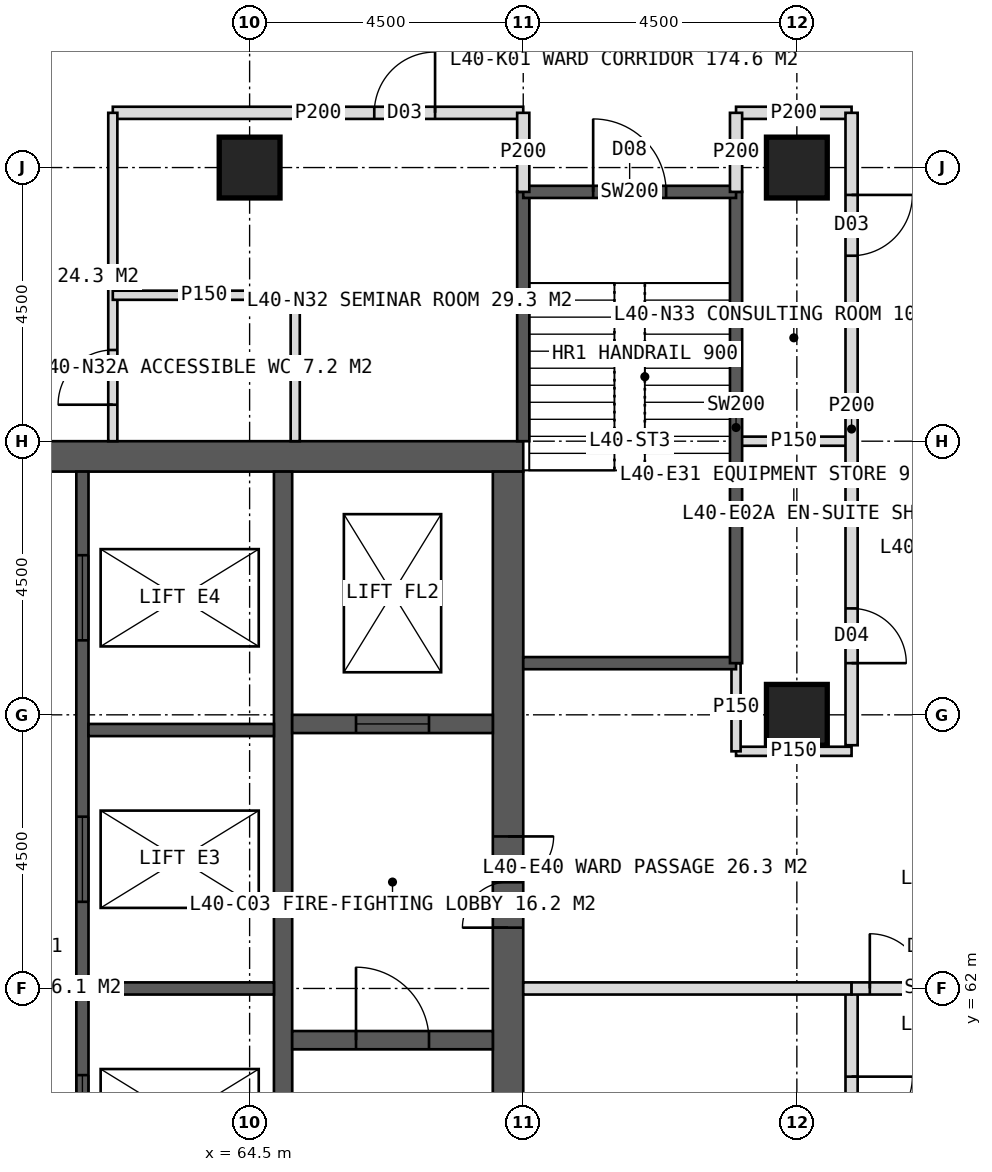
"""IFC4 building model, lengths in metres.
Left out: names, types, materials, properties, quantities, classifications, styles, units other than length and angle.
Written with IfcOpenShell. Run it as: python <this file> out.ifc"""

import sys

from ifc_helpers import new_model, si_unit, direction, frame, frame_2d, origin, origin_2d, place, context, subcontext, project, spatial, rectangle, hollow_rectangle, extrude, element, fill, save


model = new_model("IFC4")
c1 = context("Model", 3, precision=1e-05, world=origin(), true_north=direction((0.0, 1.0)))
c2 = subcontext(c1, "Body", "Model", "MODEL_VIEW")
j1 = project(units=[si_unit("LENGTHUNIT", "METRE"), si_unit("PLANEANGLEUNIT", "RADIAN")], contexts=[c1])
p1 = place(None, origin())
s1 = spatial("IfcSite", under=j1, at=p1, CompositionType="ELEMENT")
p2 = place(p1, origin())
s2 = spatial("IfcBuilding", under=s1, at=p2, CompositionType="ELEMENT")
p3 = place(p2, frame((0.0, 0.0, 168.0)))
s3 = spatial("IfcBuildingStorey", under=s2, at=p3, CompositionType="ELEMENT", Elevation=168.0)
p4 = place(p3, frame((51.0, 70.75, 0.0), z_axis=(0.0, 0.0, 1.0), x_axis=(1.0, 0.0, 0.0)))
e1 = element("IfcWall", 1, at=p4, inside=s3, PredefinedType="SHEAR", context=c2, shape_type="SweptSolid", body=[
    extrude(rectangle(XDim=18.0, YDim=0.5, at=frame_2d((9.0, 0.0))), origin(), (0.0, 0.0, 1.0), 4.0),
])
p5 = place(p4, frame((8.1, 0.0, 0.0)))
e2 = element("IfcOpeningElement", 2, at=p5, cuts=e1, PredefinedType="OPENING", context=c2, shape_type="SweptSolid", body=[
    extrude(rectangle(XDim=1.8, YDim=2.2, at=frame_2d((0.9, 1.1))), frame((0.0, 0.26, 0.0), z_axis=(0.0, -1.0, 0.0), x_axis=(1.0, 0.0, 0.0)), (0.0, 0.0, 1.0), 0.52),
])
p6 = place(p3, frame((68.75, 53.5, 0.0), z_axis=(0.0, 0.0, 1.0), x_axis=(0.0, 1.0, 0.0)))
e3 = element("IfcWall", 3, at=p6, inside=s3, PredefinedType="SHEAR", context=c2, shape_type="SweptSolid", body=[
    extrude(rectangle(XDim=17.0, YDim=0.5, at=frame_2d((8.5, 0.0))), origin(), (0.0, 0.0, 1.0), 4.0),
])
p7 = place(p6, frame((9.5, 0.0, 0.0)))
e4 = element("IfcOpeningElement", 4, at=p7, cuts=e3, PredefinedType="OPENING", context=c2, shape_type="SweptSolid", body=[
    extrude(rectangle(XDim=1.5, YDim=2.2, at=frame_2d((0.75, 1.1))), frame((0.0, 0.26, 0.0), z_axis=(0.0, -1.0, 0.0), x_axis=(1.0, 0.0, 0.0)), (0.0, 0.0, 1.0), 0.52),
])
p8 = place(p3, frame((65.05, 53.5, 0.0), z_axis=(0.0, 0.0, 1.0), x_axis=(0.0, 1.0, 0.0)))
e5 = element("IfcWall", 5, at=p8, inside=s3, PredefinedType="SHEAR", context=c2, shape_type="SweptSolid", body=[
    extrude(rectangle(XDim=17.0, YDim=0.3, at=frame_2d((8.5, 0.0))), origin(), (0.0, 0.0, 1.0), 4.0),
])
p9 = place(p3, frame((61.75, 53.5, 0.0), z_axis=(0.0, 0.0, 1.0), x_axis=(0.0, 1.0, 0.0)))
e6 = element("IfcWall", 6, at=p9, inside=s3, PredefinedType="SHEAR", context=c2, shape_type="SweptSolid", body=[
    extrude(rectangle(XDim=17.0, YDim=0.2, at=frame_2d((8.5, 0.0))), origin(), (0.0, 0.0, 1.0), 4.0),
])
p10 = place(p9, frame((1.375, 0.0, 0.0)))
e7 = element("IfcOpeningElement", 7, at=p10, cuts=e6, PredefinedType="OPENING", context=c2, shape_type="SweptSolid", body=[
    extrude(rectangle(XDim=1.4, YDim=2.2, at=frame_2d((0.7, 1.1))), frame((0.0, 0.11, 0.0), z_axis=(0.0, -1.0, 0.0), x_axis=(1.0, 0.0, 0.0)), (0.0, 0.0, 1.0), 0.22),
])
p11 = place(p9, frame((5.675, 0.0, 0.0)))
e8 = element("IfcOpeningElement", 8, at=p11, cuts=e6, PredefinedType="OPENING", context=c2, shape_type="SweptSolid", body=[
    extrude(rectangle(XDim=1.4, YDim=2.2, at=frame_2d((0.7, 1.1))), frame((0.0, 0.11, 0.0), z_axis=(0.0, -1.0, 0.0), x_axis=(1.0, 0.0, 0.0)), (0.0, 0.0, 1.0), 0.22),
])
p12 = place(p9, frame((9.925, 0.0, 0.0)))
e9 = element("IfcOpeningElement", 9, at=p12, cuts=e6, PredefinedType="OPENING", context=c2, shape_type="SweptSolid", body=[
    extrude(rectangle(XDim=1.4, YDim=2.2, at=frame_2d((0.7, 1.1))), frame((0.0, 0.11, 0.0), z_axis=(0.0, -1.0, 0.0), x_axis=(1.0, 0.0, 0.0)), (0.0, 0.0, 1.0), 0.22),
])
p13 = place(p9, frame((14.225, 0.0, 0.0)))
e10 = element("IfcOpeningElement", 10, at=p13, cuts=e6, PredefinedType="OPENING", context=c2, shape_type="SweptSolid", body=[
    extrude(rectangle(XDim=1.4, YDim=2.2, at=frame_2d((0.7, 1.1))), frame((0.0, 0.11, 0.0), z_axis=(0.0, -1.0, 0.0), x_axis=(1.0, 0.0, 0.0)), (0.0, 0.0, 1.0), 0.22),
])
for number, where, z_axis, x_axis in (
    (11, (61.85, 62.0, 0.0), (0.0, 0.0, 1.0), (1.0, 0.0, 0.0)),
    (12, (61.85, 66.25, 0.0), (0.0, 0.0, 1.0), (1.0, 0.0, 0.0)),
):
    element("IfcWall", number, at=place(p3, frame(where, z_axis=z_axis, x_axis=x_axis)), inside=s3, PredefinedType="SHEAR", context=c2, shape_type="SweptSolid", body=[
        extrude(rectangle(XDim=3.05, YDim=0.2, at=frame_2d((1.525, 0.0))), origin(), (0.0, 0.0, 1.0), 4.0),
    ])
p14 = place(p3, frame((65.2, 61.15, 0.0), z_axis=(0.0, 0.0, 1.0), x_axis=(1.0, 0.0, 0.0)))
e13 = element("IfcWall", 13, at=p14, inside=s3, PredefinedType="SHEAR", context=c2, shape_type="SweptSolid", body=[
    extrude(rectangle(XDim=3.3, YDim=0.3, at=frame_2d((1.65, 0.0))), origin(), (0.0, 0.0, 1.0), 4.0),
])
p15 = place(p14, frame((1.05, 0.0, 0.0)))
e14 = element("IfcOpeningElement", 14, at=p15, cuts=e13, PredefinedType="OPENING", context=c2, shape_type="SweptSolid", body=[
    extrude(rectangle(XDim=1.2, YDim=2.1, at=frame_2d((0.6, 1.05))), frame((0.0, 0.16, 0.0), z_axis=(0.0, -1.0, 0.0), x_axis=(1.0, 0.0, 0.0)), (0.0, 0.0, 1.0), 0.32),
])
p16 = place(p3, frame((65.2, 66.35, 0.0), z_axis=(0.0, 0.0, 1.0), x_axis=(1.0, 0.0, 0.0)))
e15 = element("IfcWall", 15, at=p16, inside=s3, PredefinedType="SHEAR", context=c2, shape_type="SweptSolid", body=[
    extrude(rectangle(XDim=3.3, YDim=0.3, at=frame_2d((1.65, 0.0))), origin(), (0.0, 0.0, 1.0), 4.0),
])
p17 = place(p16, frame((1.05, 0.0, 0.0)))
e16 = element("IfcOpeningElement", 16, at=p17, cuts=e15, PredefinedType="OPENING", context=c2, shape_type="SweptSolid", body=[
    extrude(rectangle(XDim=1.2, YDim=2.2, at=frame_2d((0.6, 1.1))), frame((0.0, 0.16, 0.0), z_axis=(0.0, -1.0, 0.0), x_axis=(1.0, 0.0, 0.0)), (0.0, 0.0, 1.0), 0.32),
])
for number, where, z_axis, x_axis in (
    (17, (73.5, 75.5, 0.0), (0.0, 0.0, 1.0), (1.0, 0.0, 0.0)),
    (18, (64.5, 75.5, 0.0), (0.0, 0.0, 1.0), (1.0, 0.0, 0.0)),
    (19, (73.5, 66.5, 0.0), (0.0, 0.0, 1.0), (1.0, 0.0, 0.0)),
):
    element("IfcColumn", number, at=place(p3, frame(where, z_axis=z_axis, x_axis=x_axis)), inside=s3, PredefinedType="COLUMN", context=c2, shape_type="SweptSolid", body=[
        extrude(hollow_rectangle(XDim=1.0, YDim=1.0, WallThickness=0.1, at=origin_2d()), origin(), (0.0, 0.0, 1.0), 4.0),
    ])
p18 = place(p3, frame((62.25, 76.4, 0.0), z_axis=(0.0, 0.0, 1.0), x_axis=(1.0, 0.0, 0.0)))
e20 = element("IfcWall", 20, at=p18, inside=s3, PredefinedType="PARTITIONING", context=c2, shape_type="SweptSolid", body=[
    extrude(rectangle(XDim=6.75, YDim=0.2, at=frame_2d((3.375, 0.0))), origin(), (0.0, 0.0, 1.0), 3.75),
])
p19 = place(p18, frame((4.3, 0.0, 0.0)))
e21 = element("IfcOpeningElement", 21, at=p19, cuts=e20, PredefinedType="OPENING", context=c2, shape_type="SweptSolid", body=[
    extrude(rectangle(XDim=1.0, YDim=2.1, at=frame_2d((0.5, 1.05))), frame((0.0, 0.11, 0.0), z_axis=(0.0, -1.0, 0.0), x_axis=(1.0, 0.0, 0.0)), (0.0, 0.0, 1.0), 0.22),
])
p20 = place(p3, frame((72.5, 76.4, 0.0), z_axis=(0.0, 0.0, 1.0), x_axis=(1.0, 0.0, 0.0)))
e22 = element("IfcWall", 22, at=p20, inside=s3, PredefinedType="PARTITIONING", context=c2, shape_type="SweptSolid", body=[
    extrude(rectangle(XDim=1.9, YDim=0.2, at=frame_2d((0.95, 0.0))), origin(), (0.0, 0.0, 1.0), 3.75),
])
p21 = place(p3, frame((62.25, 71.0, 0.0), z_axis=(0.0, 0.0, 1.0), x_axis=(0.0, 1.0, 0.0)))
e23 = element("IfcWall", 23, at=p21, inside=s3, PredefinedType="PARTITIONING", context=c2, shape_type="SweptSolid", body=[
    extrude(rectangle(XDim=5.4, YDim=0.15, at=frame_2d((2.7, 0.0))), origin(), (0.0, 0.0, 1.0), 3.75),
])
p22 = place(p21, frame((0.6, 0.0, 0.0)))
e24 = element("IfcOpeningElement", 24, at=p22, cuts=e23, PredefinedType="OPENING", context=c2, shape_type="SweptSolid", body=[
    extrude(rectangle(XDim=0.9, YDim=2.1, at=frame_2d((0.45, 1.05))), frame((0.0, 0.085, 0.0), z_axis=(0.0, -1.0, 0.0), x_axis=(1.0, 0.0, 0.0)), (0.0, 0.0, 1.0), 0.17),
])
p23 = place(p3, frame((62.25, 73.4, 0.0), z_axis=(0.0, 0.0, 1.0), x_axis=(1.0, 0.0, 0.0)))
e25 = element("IfcWall", 25, at=p23, inside=s3, PredefinedType="PARTITIONING", context=c2, shape_type="SweptSolid", body=[
    extrude(rectangle(XDim=3.0, YDim=0.15, at=frame_2d((1.5, 0.0))), origin(), (0.0, 0.0, 1.0), 3.75),
])
p24 = place(p3, frame((65.25, 71.0, 0.0), z_axis=(0.0, 0.0, 1.0), x_axis=(0.0, 1.0, 0.0)))
e26 = element("IfcWall", 26, at=p24, inside=s3, PredefinedType="PARTITIONING", context=c2, shape_type="SweptSolid", body=[
    extrude(rectangle(XDim=2.4, YDim=0.15, at=frame_2d((1.2, 0.0))), origin(), (0.0, 0.0, 1.0), 3.75),
])
p25 = place(p3, frame((72.5, 71.0, 0.0), z_axis=(0.0, 0.0, 1.0), x_axis=(1.0, 0.0, 0.0)))
e27 = element("IfcWall", 27, at=p25, inside=s3, PredefinedType="PARTITIONING", context=c2, shape_type="SweptSolid", body=[
    extrude(rectangle(XDim=1.9, YDim=0.15, at=frame_2d((0.95, 0.0))), origin(), (0.0, 0.0, 1.0), 3.75),
])
p26 = place(p3, frame((74.4, 76.4, 0.0), z_axis=(0.0, 0.0, 1.0), x_axis=(0.0, -1.0, 0.0)))
e28 = element("IfcWall", 28, at=p26, inside=s3, PredefinedType="PARTITIONING", context=c2, shape_type="SweptSolid", body=[
    extrude(rectangle(XDim=10.4, YDim=0.2, at=frame_2d((5.2, 0.0))), origin(), (0.0, 0.0, 1.0), 3.75),
])
p27 = place(p26, frame((1.35, 0.0, 0.0)))
e29 = element("IfcOpeningElement", 29, at=p27, cuts=e28, PredefinedType="OPENING", context=c2, shape_type="SweptSolid", body=[
    extrude(rectangle(XDim=1.0, YDim=2.1, at=frame_2d((0.5, 1.05))), frame((0.0, 0.11, 0.0), z_axis=(0.0, -1.0, 0.0), x_axis=(1.0, 0.0, 0.0)), (0.0, 0.0, 1.0), 0.22),
])
p28 = place(p26, frame((8.15, 0.0, 0.0)))
e30 = element("IfcOpeningElement", 30, at=p28, cuts=e28, PredefinedType="OPENING", context=c2, shape_type="SweptSolid", body=[
    extrude(rectangle(XDim=0.9, YDim=2.1, at=frame_2d((0.45, 1.05))), frame((0.0, 0.11, 0.0), z_axis=(0.0, -1.0, 0.0), x_axis=(1.0, 0.0, 0.0)), (0.0, 0.0, 1.0), 0.22),
])
p29 = place(p3, frame((74.4, 62.0, 0.0), z_axis=(0.0, 0.0, 1.0), x_axis=(0.0, -1.0, 0.0)))
e31 = element("IfcWall", 31, at=p29, inside=s3, PredefinedType="PARTITIONING", context=c2, shape_type="SweptSolid", body=[
    extrude(rectangle(XDim=14.4, YDim=0.2, at=frame_2d((7.2, 0.0))), origin(), (0.0, 0.0, 1.0), 3.75),
])
p30 = place(p29, frame((1.45, 0.0, 0.0)))
e32 = element("IfcOpeningElement", 32, at=p30, cuts=e31, PredefinedType="OPENING", context=c2, shape_type="SweptSolid", body=[
    extrude(rectangle(XDim=1.0, YDim=2.1, at=frame_2d((0.5, 1.05))), frame((0.0, 0.11, 0.0), z_axis=(0.0, -1.0, 0.0), x_axis=(1.0, 0.0, 0.0)), (0.0, 0.0, 1.0), 0.22),
])
p31 = place(p29, frame((11.2, 0.0, 0.0)))
e33 = element("IfcOpeningElement", 33, at=p31, cuts=e31, PredefinedType="OPENING", context=c2, shape_type="SweptSolid", body=[
    extrude(rectangle(XDim=1.0, YDim=2.1, at=frame_2d((0.5, 1.05))), frame((0.0, 0.11, 0.0), z_axis=(0.0, -1.0, 0.0), x_axis=(1.0, 0.0, 0.0)), (0.0, 0.0, 1.0), 0.22),
])
p32 = place(p3, frame((72.5, 65.9, 0.0), z_axis=(0.0, 0.0, 1.0), x_axis=(1.0, 0.0, 0.0)))
e34 = element("IfcWall", 34, at=p32, inside=s3, PredefinedType="PARTITIONING", context=c2, shape_type="SweptSolid", body=[
    extrude(rectangle(XDim=1.9, YDim=0.15, at=frame_2d((0.95, 0.0))), origin(), (0.0, 0.0, 1.0), 3.75),
])
p33 = place(p3, frame((69.0, 62.0, 0.0), z_axis=(0.0, 0.0, 1.0), x_axis=(1.0, 0.0, 0.0)))
e35 = element("IfcWall", 35, at=p33, inside=s3, PredefinedType="SOLIDWALL", context=c2, shape_type="SweptSolid", body=[
    extrude(rectangle(XDim=5.4, YDim=0.2, at=frame_2d((2.7, 0.0))), origin(), (0.0, 0.0, 1.0), 2.95),
])
p34 = place(p3, frame((74.4, 62.0, 0.0), z_axis=(0.0, 0.0, 1.0), x_axis=(1.0, 0.0, 0.0)))
e36 = element("IfcWall", 36, at=p34, inside=s3, PredefinedType="SOLIDWALL", context=c2, shape_type="SweptSolid", body=[
    extrude(rectangle(XDim=2.7, YDim=0.2, at=frame_2d((1.35, 0.0))), origin(), (0.0, 0.0, 1.0), 2.95),
])
p35 = place(p34, frame((0.3, 0.0, 0.0)))
e37 = element("IfcOpeningElement", 37, at=p35, cuts=e36, PredefinedType="OPENING", context=c2, shape_type="SweptSolid", body=[
    extrude(rectangle(XDim=1.8, YDim=2.2, at=frame_2d((0.9, 1.1))), frame((0.0, 0.11, 0.0), z_axis=(0.0, -1.0, 0.0), x_axis=(1.0, 0.0, 0.0)), (0.0, 0.0, 1.0), 0.22),
])
p36 = place(p3, frame((72.5, 65.9, 0.0), z_axis=(0.0, 0.0, 1.0), x_axis=(0.0, 1.0, 0.0)))
e38 = element("IfcWall", 38, at=p36, inside=s3, PredefinedType="PARTITIONING", context=c2, shape_type="SweptSolid", body=[
    extrude(rectangle(XDim=1.45, YDim=0.15, at=frame_2d((0.725, 0.0))), origin(), (0.0, 0.0, 1.0), 3.75),
])
p37 = place(p3, frame((69.0, 71.0, 0.0), z_axis=(0.0, 0.0, 1.0), x_axis=(0.0, 1.0, 0.0)))
e39 = element("IfcWall", 39, at=p37, inside=s3, PredefinedType="SOLIDWALL", context=c2, shape_type="SweptSolid", body=[
    extrude(rectangle(XDim=4.1, YDim=0.2, at=frame_2d((2.05, 0.0))), origin(), (0.0, 0.0, 1.0), 3.75),
])
p38 = place(p3, frame((69.0, 67.35, 0.0), z_axis=(0.0, 0.0, 1.0), x_axis=(1.0, 0.0, 0.0)))
e40 = element("IfcWall", 40, at=p38, inside=s3, PredefinedType="SOLIDWALL", context=c2, shape_type="SweptSolid", body=[
    extrude(rectangle(XDim=3.5, YDim=0.2, at=frame_2d((1.75, 0.0))), origin(), (0.0, 0.0, 1.0), 3.75),
])
p39 = place(p3, frame((72.5, 67.35, 0.0), z_axis=(0.0, 0.0, 1.0), x_axis=(0.0, 1.0, 0.0)))
e41 = element("IfcWall", 41, at=p39, inside=s3, PredefinedType="SOLIDWALL", context=c2, shape_type="SweptSolid", body=[
    extrude(rectangle(XDim=7.75, YDim=0.2, at=frame_2d((3.875, 0.0))), origin(), (0.0, 0.0, 1.0), 3.75),
])
p40 = place(p3, frame((69.0, 75.1, 0.0), z_axis=(0.0, 0.0, 1.0), x_axis=(1.0, 0.0, 0.0)))
e42 = element("IfcWall", 42, at=p40, inside=s3, PredefinedType="SOLIDWALL", context=c2, shape_type="SweptSolid", body=[
    extrude(rectangle(XDim=3.5, YDim=0.2, at=frame_2d((1.75, 0.0))), origin(), (0.0, 0.0, 1.0), 3.75),
])
p41 = place(p40, frame((1.15, 0.0, 0.0)))
e43 = element("IfcOpeningElement", 43, at=p41, cuts=e42, PredefinedType="OPENING", context=c2, shape_type="SweptSolid", body=[
    extrude(rectangle(XDim=1.2, YDim=2.1, at=frame_2d((0.6, 1.05))), frame((0.0, 0.11, 0.0), z_axis=(0.0, -1.0, 0.0), x_axis=(1.0, 0.0, 0.0)), (0.0, 0.0, 1.0), 0.22),
])
for number, where, z_axis, x_axis in (
    (44, (69.0, 75.1, 0.0), (0.0, 0.0, 1.0), (0.0, 1.0, 0.0)),
    (45, (72.5, 75.1, 0.0), (0.0, 0.0, 1.0), (0.0, 1.0, 0.0)),
):
    element("IfcWall", number, at=place(p3, frame(where, z_axis=z_axis, x_axis=x_axis)), inside=s3, PredefinedType="PARTITIONING", context=c2, shape_type="SweptSolid", body=[
        extrude(rectangle(XDim=1.3, YDim=0.2, at=frame_2d((0.65, 0.0))), origin(), (0.0, 0.0, 1.0), 3.75),
    ])
p42 = place(p22, origin())
e46 = element("IfcDoor", 46, at=p42, inside=s3, OperationType="SINGLE_SWING_LEFT", PredefinedType="DOOR", context=c2, shape_type="SweptSolid", body=[
    extrude(rectangle(XDim=0.9, YDim=2.1, at=frame_2d((0.45, 1.05))), frame((0.0, 0.025, 0.0), z_axis=(0.0, -1.0, 0.0), x_axis=(1.0, 0.0, 0.0)), (0.0, 0.0, 1.0), 0.05),
])
fill(e24, e46)
p43 = place(p19, origin())
e47 = element("IfcDoor", 47, at=p43, inside=s3, OperationType="SINGLE_SWING_RIGHT", PredefinedType="DOOR", context=c2, shape_type="SweptSolid", body=[
    extrude(rectangle(XDim=1.0, YDim=2.1, at=frame_2d((0.5, 1.05))), frame((0.0, 0.025, 0.0), z_axis=(0.0, -1.0, 0.0), x_axis=(1.0, 0.0, 0.0)), (0.0, 0.0, 1.0), 0.05),
])
fill(e21, e47)
p44 = place(p27, origin())
e48 = element("IfcDoor", 48, at=p44, inside=s3, OperationType="SINGLE_SWING_LEFT", PredefinedType="DOOR", context=c2, shape_type="SweptSolid", body=[
    extrude(rectangle(XDim=1.0, YDim=2.1, at=frame_2d((0.5, 1.05))), frame((0.0, 0.025, 0.0), z_axis=(0.0, -1.0, 0.0), x_axis=(1.0, 0.0, 0.0)), (0.0, 0.0, 1.0), 0.05),
])
fill(e29, e48)
p45 = place(p28, origin())
e49 = element("IfcDoor", 49, at=p45, inside=s3, OperationType="SINGLE_SWING_RIGHT", PredefinedType="DOOR", context=c2, shape_type="SweptSolid", body=[
    extrude(rectangle(XDim=0.9, YDim=2.1, at=frame_2d((0.45, 1.05))), frame((0.0, 0.025, 0.0), z_axis=(0.0, -1.0, 0.0), x_axis=(1.0, 0.0, 0.0)), (0.0, 0.0, 1.0), 0.05),
])
fill(e30, e49)
p46 = place(p30, origin())
e50 = element("IfcDoor", 50, at=p46, inside=s3, OperationType="SINGLE_SWING_LEFT", PredefinedType="DOOR", context=c2, shape_type="SweptSolid", body=[
    extrude(rectangle(XDim=1.0, YDim=2.1, at=frame_2d((0.5, 1.05))), frame((0.0, 0.025, 0.0), z_axis=(0.0, -1.0, 0.0), x_axis=(1.0, 0.0, 0.0)), (0.0, 0.0, 1.0), 0.05),
])
fill(e32, e50)
p47 = place(p35, origin())
e51 = element("IfcDoor", 51, at=p47, inside=s3, OperationType="DOUBLE_DOOR_DOUBLE_SWING", PredefinedType="DOOR", context=c2, shape_type="SweptSolid", body=[
    extrude(rectangle(XDim=1.8, YDim=2.2, at=frame_2d((0.9, 1.1))), frame((0.0, 0.025, 0.0), z_axis=(0.0, -1.0, 0.0), x_axis=(1.0, 0.0, 0.0)), (0.0, 0.0, 1.0), 0.05),
])
fill(e37, e51)
p48 = place(p7, origin())
e52 = element("IfcDoor", 52, at=p48, inside=s3, OperationType="DOUBLE_DOOR_SINGLE_SWING", PredefinedType="DOOR", context=c2, shape_type="SweptSolid", body=[
    extrude(rectangle(XDim=1.5, YDim=2.2, at=frame_2d((0.75, 1.1))), frame((0.0, 0.025, 0.0), z_axis=(0.0, -1.0, 0.0), x_axis=(1.0, 0.0, 0.0)), (0.0, 0.0, 1.0), 0.05),
])
fill(e4, e52)
p49 = place(p15, origin())
e53 = element("IfcDoor", 53, at=p49, inside=s3, OperationType="SINGLE_SWING_LEFT", PredefinedType="DOOR", context=c2, shape_type="SweptSolid", body=[
    extrude(rectangle(XDim=1.2, YDim=2.1, at=frame_2d((0.6, 1.05))), frame((0.0, 0.025, 0.0), z_axis=(0.0, -1.0, 0.0), x_axis=(1.0, 0.0, 0.0)), (0.0, 0.0, 1.0), 0.05),
])
fill(e14, e53)
p50 = place(p17, origin())
e54 = element("IfcDoor", 54, at=p50, inside=s3, OperationType="SLIDING_TO_LEFT", PredefinedType="DOOR", context=c2, shape_type="SweptSolid", body=[
    extrude(rectangle(XDim=1.2, YDim=2.2, at=frame_2d((0.6, 1.1))), frame((0.0, 0.025, 0.0), z_axis=(0.0, -1.0, 0.0), x_axis=(1.0, 0.0, 0.0)), (0.0, 0.0, 1.0), 0.05),
])
fill(e16, e54)
p51 = place(p11, origin())
e55 = element("IfcDoor", 55, at=p51, inside=s3, OperationType="SLIDING_TO_LEFT", PredefinedType="DOOR", context=c2, shape_type="SweptSolid", body=[
    extrude(rectangle(XDim=1.4, YDim=2.2, at=frame_2d((0.7, 1.1))), frame((0.0, 0.025, 0.0), z_axis=(0.0, -1.0, 0.0), x_axis=(1.0, 0.0, 0.0)), (0.0, 0.0, 1.0), 0.05),
])
fill(e8, e55)
p52 = place(p12, origin())
e56 = element("IfcDoor", 56, at=p52, inside=s3, OperationType="SLIDING_TO_LEFT", PredefinedType="DOOR", context=c2, shape_type="SweptSolid", body=[
    extrude(rectangle(XDim=1.4, YDim=2.2, at=frame_2d((0.7, 1.1))), frame((0.0, 0.025, 0.0), z_axis=(0.0, -1.0, 0.0), x_axis=(1.0, 0.0, 0.0)), (0.0, 0.0, 1.0), 0.05),
])
fill(e9, e56)
p53 = place(p13, origin())
e57 = element("IfcDoor", 57, at=p53, inside=s3, OperationType="SLIDING_TO_LEFT", PredefinedType="DOOR", context=c2, shape_type="SweptSolid", body=[
    extrude(rectangle(XDim=1.4, YDim=2.2, at=frame_2d((0.7, 1.1))), frame((0.0, 0.025, 0.0), z_axis=(0.0, -1.0, 0.0), x_axis=(1.0, 0.0, 0.0)), (0.0, 0.0, 1.0), 0.05),
])
fill(e10, e57)
p54 = place(p41, origin())
e58 = element("IfcDoor", 58, at=p54, inside=s3, OperationType="SINGLE_SWING_LEFT", PredefinedType="DOOR", context=c2, shape_type="SweptSolid", body=[
    extrude(rectangle(XDim=1.2, YDim=2.1, at=frame_2d((0.6, 1.05))), frame((0.0, 0.025, 0.0), z_axis=(0.0, -1.0, 0.0), x_axis=(1.0, 0.0, 0.0)), (0.0, 0.0, 1.0), 0.05),
])
fill(e43, e58)
save(model, sys.argv[1])
